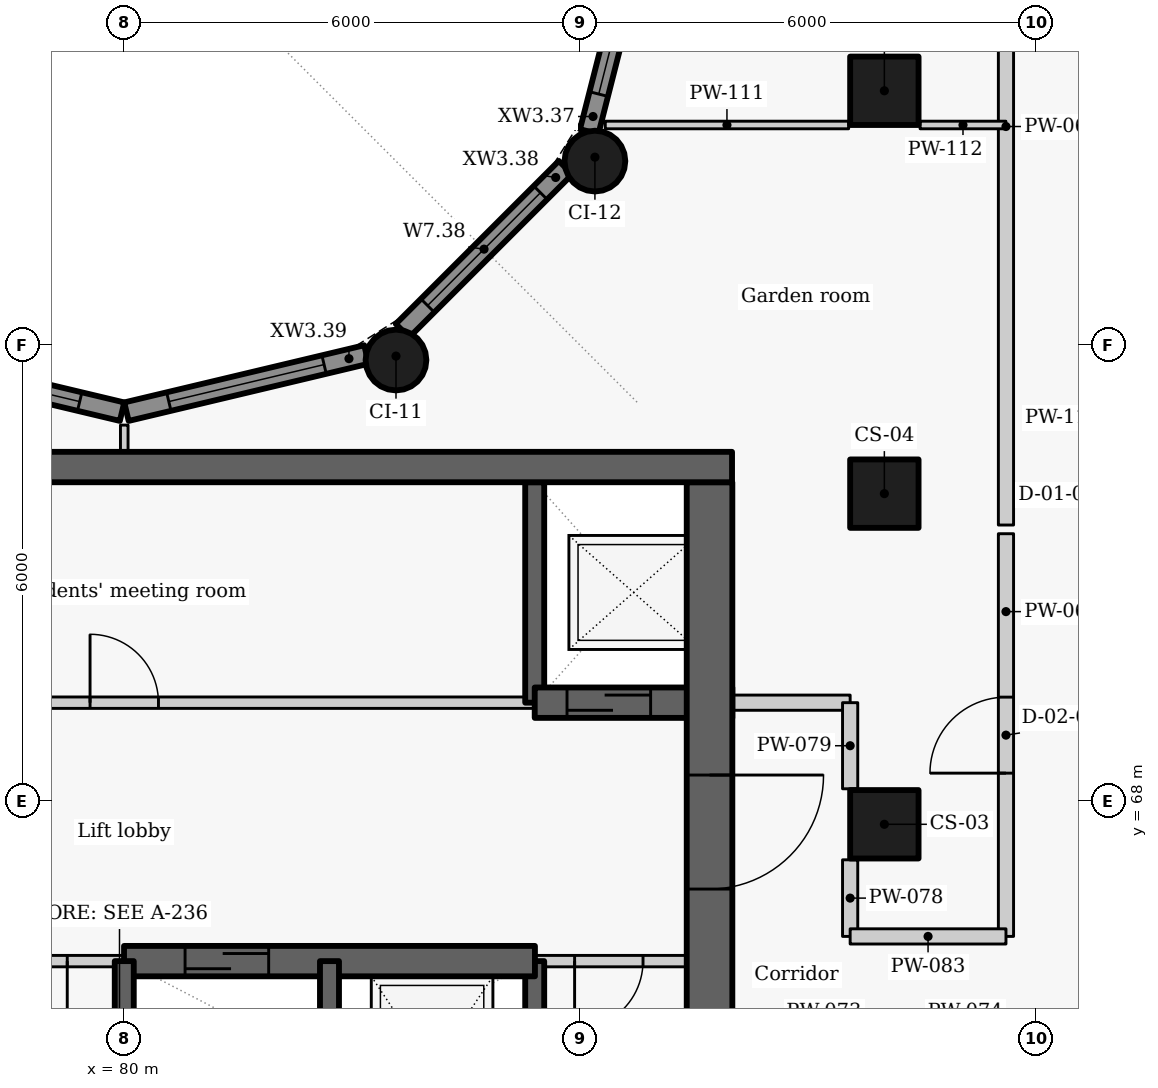
"""IFC4 building model, lengths in metres.
Left out: names, types, materials, properties, quantities, classifications, styles, units other than length and angle.
Written with IfcOpenShell. Run it as: python <this file> out.ifc"""

import sys

from ifc_helpers import new_model, si_unit, direction, frame, frame_2d, origin, origin_2d, place, context, subcontext, project, spatial, rectangle, circle, extrude, element, fill, save


model = new_model("IFC4")
c1 = context("Model", 3, precision=1e-05, world=origin(), true_north=direction((0.0, 1.0)))
c2 = subcontext(c1, "Body", "Model", "MODEL_VIEW")
j1 = project(units=[si_unit("LENGTHUNIT", "METRE"), si_unit("PLANEANGLEUNIT", "RADIAN")], contexts=[c1])
p1 = place(None, origin())
s1 = spatial("IfcSite", under=j1, at=p1, CompositionType="ELEMENT")
p2 = place(p1, origin())
s2 = spatial("IfcBuilding", under=s1, at=p2, CompositionType="ELEMENT")
p3 = place(p2, frame((0.0, 0.0, 213.0)))
s3 = spatial("IfcBuildingStorey", under=s2, at=p3, CompositionType="ELEMENT", Elevation=213.0)
for number, where, z_axis, x_axis in (
    (1, (90.0, 67.7, 0.0), (0.0, 0.0, 1.0), (0.0, 1.0, 0.0)),
    (2, (90.0, 72.05, 0.0), (0.0, 0.0, 1.0), (0.0, 1.0, 0.0)),
    (3, (90.0, 77.35, 0.0), (0.0, 0.0, 1.0), (0.0, 1.0, 0.0)),
):
    element("IfcColumn", number, at=place(p3, frame(where, z_axis=z_axis, x_axis=x_axis)), inside=s3, PredefinedType="COLUMN", context=c2, shape_type="SweptSolid", body=[
        extrude(rectangle(XDim=0.9, YDim=0.9, at=origin_2d()), origin(), (0.0, 0.0, 1.0), 3.3),
    ])
for number, where, z_axis, x_axis in (
    (4, (83.575, 73.808, 0.0), (0.0, 0.0, 1.0), (0.866, 0.5, 0.0)),
    (5, (86.192, 76.425, 0.0), (0.0, 0.0, 1.0), (0.5, 0.866, 0.0)),
):
    element("IfcColumn", number, at=place(p3, frame(where, z_axis=z_axis, x_axis=x_axis)), inside=s3, PredefinedType="COLUMN", context=c2, shape_type="SweptSolid", body=[
        extrude(circle(Radius=0.4, at=origin_2d()), origin(), (0.0, 0.0, 1.0), 3.3),
    ])
p4 = place(p3, frame((86.86, 79.73, 0.0), z_axis=(0.0, 0.0, 1.0), x_axis=(-0.247055971283, -0.969001211069, 0.0)))
e6 = element("IfcWall", 6, at=p4, inside=s3, PredefinedType="SOLIDWALL", context=c2, shape_type="SweptSolid", body=[
    extrude(rectangle(XDim=3.01, YDim=0.25, at=frame_2d((1.505, 0.0))), origin(), (0.0, 0.0, 1.0), 2.425),
])
p5 = place(p4, frame((0.401, 0.0, 0.9)))
e7 = element("IfcOpeningElement", 7, at=p5, cuts=e6, PredefinedType="OPENING", context=c2, shape_type="SweptSolid", body=[
    extrude(rectangle(XDim=2.1, YDim=1.1, at=frame_2d((1.05, 0.55))), frame((0.0, 0.135, 0.0), z_axis=(0.0, -1.0, 0.0), x_axis=(1.0, 0.0, 0.0)), (0.0, 0.0, 1.0), 0.27),
])
p6 = place(p3, frame((85.806, 76.339, 0.0), z_axis=(0.0, 0.0, 1.0), x_axis=(-0.707106781187, -0.707106781187, 0.0)))
e8 = element("IfcWall", 8, at=p6, inside=s3, PredefinedType="SOLIDWALL", context=c2, shape_type="SweptSolid", body=[
    extrude(rectangle(XDim=3.033, YDim=0.25, at=frame_2d((1.517, 0.0))), origin(), (0.0, 0.0, 1.0), 2.425),
])
p7 = place(p6, frame((0.467, 0.0, 0.9)))
e9 = element("IfcOpeningElement", 9, at=p7, cuts=e8, PredefinedType="OPENING", context=c2, shape_type="SweptSolid", body=[
    extrude(rectangle(XDim=2.1, YDim=1.1, at=frame_2d((1.05, 0.55))), frame((0.0, 0.135, 0.0), z_axis=(0.0, -1.0, 0.0), x_axis=(1.0, 0.0, 0.0)), (0.0, 0.0, 1.0), 0.27),
])
p8 = place(p3, frame((83.186, 73.881, 0.0), z_axis=(0.0, 0.0, 1.0), x_axis=(-0.972773113459, -0.231759508395, 0.0)))
e10 = element("IfcWall", 10, at=p8, inside=s3, PredefinedType="SOLIDWALL", context=c2, shape_type="SweptSolid", body=[
    extrude(rectangle(XDim=3.246, YDim=0.25, at=frame_2d((1.623, 0.0))), origin(), (0.0, 0.0, 1.0), 2.425),
])
p9 = place(p8, frame((0.573, 0.0, 0.9)))
e11 = element("IfcOpeningElement", 11, at=p9, cuts=e10, PredefinedType="OPENING", context=c2, shape_type="SweptSolid", body=[
    extrude(rectangle(XDim=2.1, YDim=1.1, at=frame_2d((1.05, 0.55))), frame((0.0, 0.135, 0.0), z_axis=(0.0, -1.0, 0.0), x_axis=(1.0, 0.0, 0.0)), (0.0, 0.0, 1.0), 0.27),
])
p10 = place(p3, frame((79.971, 73.128, 0.0), z_axis=(0.0, 0.0, 1.0), x_axis=(-0.972773113459, 0.231759508395, 0.0)))
e12 = element("IfcWall", 12, at=p10, inside=s3, PredefinedType="SOLIDWALL", context=c2, shape_type="SweptSolid", body=[
    extrude(rectangle(XDim=3.246, YDim=0.25, at=frame_2d((1.623, 0.0))), origin(), (0.0, 0.0, 1.0), 2.425),
])
p11 = place(p10, frame((0.573, 0.0, 0.9)))
e13 = element("IfcOpeningElement", 13, at=p11, cuts=e12, PredefinedType="OPENING", context=c2, shape_type="SweptSolid", body=[
    extrude(rectangle(XDim=2.1, YDim=1.1, at=frame_2d((1.05, 0.55))), frame((0.0, 0.135, 0.0), z_axis=(0.0, -1.0, 0.0), x_axis=(1.0, 0.0, 0.0)), (0.0, 0.0, 1.0), 0.27),
])
p12 = place(p3, frame((72.0, 69.3, 0.0), z_axis=(0.0, 0.0, 1.0), x_axis=(1.0, 0.0, 0.0)))
e14 = element("IfcWall", 14, at=p12, inside=s3, PredefinedType="PARTITIONING", context=c2, shape_type="SweptSolid", body=[
    extrude(rectangle(XDim=13.4, YDim=0.15, at=frame_2d((6.7, 0.0))), origin(), (0.0, 0.0, 1.0), 3.025),
])
p13 = place(p12, frame((1.175, 0.0, 0.0)))
e15 = element("IfcOpeningElement", 15, at=p13, cuts=e14, PredefinedType="OPENING", context=c2, shape_type="SweptSolid", body=[
    extrude(rectangle(XDim=0.9, YDim=2.1, at=frame_2d((0.45, 1.05))), frame((0.0, 0.085, 0.0), z_axis=(0.0, -1.0, 0.0), x_axis=(1.0, 0.0, 0.0)), (0.0, 0.0, 1.0), 0.17),
])
p14 = place(p12, frame((7.55, 0.0, 0.0)))
e16 = element("IfcOpeningElement", 16, at=p14, cuts=e14, PredefinedType="OPENING", context=c2, shape_type="SweptSolid", body=[
    extrude(rectangle(XDim=0.9, YDim=2.1, at=frame_2d((0.45, 1.05))), frame((0.0, 0.085, 0.0), z_axis=(0.0, -1.0, 0.0), x_axis=(1.0, 0.0, 0.0)), (0.0, 0.0, 1.0), 0.17),
])
p15 = place(p3, frame((85.4, 63.1, -0.275), z_axis=(0.0, 0.0, 1.0), x_axis=(0.0, 1.0, 0.0)))
e17 = element("IfcWall", 17, at=p15, inside=s3, PredefinedType="SHEAR", context=c2, shape_type="SweptSolid", body=[
    extrude(rectangle(XDim=2.8, YDim=0.25, at=frame_2d((1.4, 0.0))), origin(), (0.0, 0.0, 1.0), 3.3),
])
p16 = place(p3, frame((85.4, 69.3, -0.275), z_axis=(0.0, 0.0, 1.0), x_axis=(0.0, 1.0, 0.0)))
e18 = element("IfcWall", 18, at=p16, inside=s3, PredefinedType="SHEAR", context=c2, shape_type="SweptSolid", body=[
    extrude(rectangle(XDim=2.9, YDim=0.25, at=frame_2d((1.45, 0.0))), origin(), (0.0, 0.0, 1.0), 3.3),
])
p17 = place(p3, frame((85.4, 69.3, -0.275), z_axis=(0.0, 0.0, 1.0), x_axis=(1.0, 0.0, 0.0)))
e19 = element("IfcWall", 19, at=p17, inside=s3, PredefinedType="SHEAR", context=c2, shape_type="SweptSolid", body=[
    extrude(rectangle(XDim=2.6, YDim=0.4, at=frame_2d((1.3, 0.0))), origin(), (0.0, 0.0, 1.0), 3.3),
])
p18 = place(p17, frame((0.425, 0.0, 0.275)))
e20 = element("IfcOpeningElement", 20, at=p18, cuts=e19, PredefinedType="OPENING", context=c2, shape_type="SweptSolid", body=[
    extrude(rectangle(XDim=1.1, YDim=2.1, at=frame_2d((0.55, 1.05))), frame((0.0, 0.21, 0.0), z_axis=(0.0, -1.0, 0.0), x_axis=(1.0, 0.0, 0.0)), (0.0, 0.0, 1.0), 0.42),
])
p19 = place(p3, frame((87.7, 72.2, -0.275), z_axis=(0.0, 0.0, 1.0), x_axis=(0.0, -1.0, 0.0)))
e21 = element("IfcWall", 21, at=p19, inside=s3, PredefinedType="SHEAR", context=c2, shape_type="SweptSolid", body=[
    extrude(rectangle(XDim=14.25, YDim=0.6, at=frame_2d((7.125, 0.0))), origin(), (0.0, 0.0, 1.0), 3.3),
])
p20 = place(p19, frame((3.852, 0.0, 0.275)))
e22 = element("IfcOpeningElement", 22, at=p20, cuts=e21, PredefinedType="OPENING", context=c2, shape_type="SweptSolid", body=[
    extrude(rectangle(XDim=1.5, YDim=2.1, at=frame_2d((0.75, 1.05))), frame((0.0, 0.31, 0.0), z_axis=(0.0, -1.0, 0.0), x_axis=(1.0, 0.0, 0.0)), (0.0, 0.0, 1.0), 0.62),
])
p21 = place(p3, frame((80.003, 65.9, 0.0), z_axis=(0.0, 0.0, 1.0), x_axis=(-1.0, 0.0, 0.0)))
e23 = element("IfcWall", 23, at=p21, inside=s3, PredefinedType="PARTITIONING", context=c2, shape_type="SweptSolid", body=[
    extrude(rectangle(XDim=2.706, YDim=0.15, at=frame_2d((1.353, 0.0))), origin(), (0.0, 0.0, 1.0), 3.025),
])
p22 = place(p21, frame((0.753, 0.0, 0.0)))
e24 = element("IfcOpeningElement", 24, at=p22, cuts=e23, PredefinedType="OPENING", context=c2, shape_type="SweptSolid", body=[
    extrude(rectangle(XDim=1.2, YDim=2.1, at=frame_2d((0.6, 1.05))), frame((0.0, 0.085, 0.0), z_axis=(0.0, -1.0, 0.0), x_axis=(1.0, 0.0, 0.0)), (0.0, 0.0, 1.0), 0.17),
])
p23 = place(p3, frame((88.0, 65.9, 0.0), z_axis=(0.0, 0.0, 1.0), x_axis=(-1.0, 0.0, 0.0)))
e25 = element("IfcWall", 25, at=p23, inside=s3, PredefinedType="PARTITIONING", context=c2, shape_type="SweptSolid", body=[
    extrude(rectangle(XDim=2.603, YDim=0.15, at=frame_2d((1.302, 0.0))), origin(), (0.0, 0.0, 1.0), 3.025),
])
p24 = place(p23, frame((1.175, 0.0, 0.0)))
e26 = element("IfcOpeningElement", 26, at=p24, cuts=e25, PredefinedType="OPENING", context=c2, shape_type="SweptSolid", body=[
    extrude(rectangle(XDim=0.9, YDim=2.1, at=frame_2d((0.45, 1.05))), frame((0.0, 0.085, 0.0), z_axis=(0.0, -1.0, 0.0), x_axis=(1.0, 0.0, 0.0)), (0.0, 0.0, 1.0), 0.17),
])
p25 = place(p3, frame((79.997, 65.9, -0.275), z_axis=(0.0, 0.0, 1.0), x_axis=(1.0, 0.0, 0.0)))
e27 = element("IfcWall", 27, at=p25, inside=s3, PredefinedType="SHEAR", context=c2, shape_type="SweptSolid", body=[
    extrude(rectangle(XDim=5.406, YDim=0.4, at=frame_2d((2.703, 0.0))), origin(), (0.0, 0.0, 1.0), 3.3),
])
p26 = place(p25, frame((0.803, 0.0, 0.275)))
e28 = element("IfcOpeningElement", 28, at=p26, cuts=e27, PredefinedType="OPENING", context=c2, shape_type="SweptSolid", body=[
    extrude(rectangle(XDim=1.1, YDim=2.1, at=frame_2d((0.55, 1.05))), frame((0.0, 0.21, 0.0), z_axis=(0.0, -1.0, 0.0), x_axis=(1.0, 0.0, 0.0)), (0.0, 0.0, 1.0), 0.42),
])
for number, where, z_axis, x_axis in (
    (29, (80.0, 63.1, -0.275), (0.0, 0.0, 1.0), (0.0, 1.0, 0.0)),
    (30, (82.7, 63.1, -0.275), (0.0, 0.0, 1.0), (0.0, 1.0, 0.0)),
):
    element("IfcWall", number, at=place(p3, frame(where, z_axis=z_axis, x_axis=x_axis)), inside=s3, PredefinedType="SHEAR", context=c2, shape_type="SweptSolid", body=[
        extrude(rectangle(XDim=2.8, YDim=0.25, at=frame_2d((1.4, 0.0))), origin(), (0.0, 0.0, 1.0), 3.3),
    ])
p27 = place(p3, frame((91.6, 66.225, 0.0), z_axis=(0.0, 0.0, 1.0), x_axis=(0.0, 1.0, 0.0)))
e31 = element("IfcWall", 31, at=p27, inside=s3, PredefinedType="PARTITIONING", context=c2, shape_type="SweptSolid", body=[
    extrude(rectangle(XDim=5.298, YDim=0.2, at=frame_2d((2.649, 0.0))), origin(), (0.0, 0.0, 1.0), 3.025),
])
p28 = place(p27, frame((2.148, 0.0, 0.0)))
e32 = element("IfcOpeningElement", 32, at=p28, cuts=e31, PredefinedType="OPENING", context=c2, shape_type="SweptSolid", body=[
    extrude(rectangle(XDim=1.0, YDim=2.1, at=frame_2d((0.5, 1.05))), frame((0.0, 0.11, 0.0), z_axis=(0.0, -1.0, 0.0), x_axis=(1.0, 0.0, 0.0)), (0.0, 0.0, 1.0), 0.22),
])
p29 = place(p3, frame((91.6, 71.637, 0.0), z_axis=(0.0, 0.0, 1.0), x_axis=(0.0, 1.0, 0.0)))
e33 = element("IfcWall", 33, at=p29, inside=s3, PredefinedType="PARTITIONING", context=c2, shape_type="SweptSolid", body=[
    extrude(rectangle(XDim=10.486, YDim=0.2, at=frame_2d((5.243, 0.0))), origin(), (0.0, 0.0, 1.0), 3.025),
])
p30 = place(p3, frame((88.0, 69.3, 0.0), z_axis=(0.0, 0.0, 1.0), x_axis=(1.0, 0.0, 0.0)))
e34 = element("IfcWall", 34, at=p30, inside=s3, PredefinedType="PARTITIONING", context=c2, shape_type="SweptSolid", body=[
    extrude(rectangle(XDim=1.55, YDim=0.2, at=frame_2d((0.775, 0.0))), origin(), (0.0, 0.0, 1.0), 3.025),
])
p31 = place(p3, frame((89.55, 66.225, 0.0), z_axis=(0.0, 0.0, 1.0), x_axis=(0.0, 1.0, 0.0)))
e35 = element("IfcWall", 35, at=p31, inside=s3, PredefinedType="PARTITIONING", context=c2, shape_type="SweptSolid", body=[
    extrude(rectangle(XDim=1.008, YDim=0.2, at=frame_2d((0.504, 0.0))), origin(), (0.0, 0.0, 1.0), 3.025),
])
p32 = place(p3, frame((89.55, 68.167, 0.0), z_axis=(0.0, 0.0, 1.0), x_axis=(0.0, 1.0, 0.0)))
e36 = element("IfcWall", 36, at=p32, inside=s3, PredefinedType="PARTITIONING", context=c2, shape_type="SweptSolid", body=[
    extrude(rectangle(XDim=1.133, YDim=0.2, at=frame_2d((0.566, 0.0))), origin(), (0.0, 0.0, 1.0), 3.025),
])
p33 = place(p3, frame((89.55, 66.225, 0.0), z_axis=(0.0, 0.0, 1.0), x_axis=(1.0, 0.0, 0.0)))
e37 = element("IfcWall", 37, at=p33, inside=s3, PredefinedType="PARTITIONING", context=c2, shape_type="SweptSolid", body=[
    extrude(rectangle(XDim=2.05, YDim=0.2, at=frame_2d((1.025, 0.0))), origin(), (0.0, 0.0, 1.0), 2.505),
])
p34 = place(p3, frame((80.0, 72.6, 0.0), z_axis=(0.0, 0.0, 1.0), x_axis=(0.0, 1.0, 0.0)))
e38 = element("IfcWall", 38, at=p34, inside=s3, PredefinedType="PARTITIONING", context=c2, shape_type="SweptSolid", body=[
    extrude(rectangle(XDim=0.352, YDim=0.1, at=frame_2d((0.176, 0.0))), origin(), (0.0, 0.0, 1.0), 3.025),
])
p35 = place(p3, frame((86.328, 76.9, 0.0), z_axis=(0.0, 0.0, 1.0), x_axis=(1.0, 0.0, 0.0)))
e39 = element("IfcWall", 39, at=p35, inside=s3, PredefinedType="PARTITIONING", context=c2, shape_type="SweptSolid", body=[
    extrude(rectangle(XDim=3.202, YDim=0.1, at=frame_2d((1.601, 0.0))), origin(), (0.0, 0.0, 1.0), 3.025),
])
p36 = place(p3, frame((90.47, 76.9, 0.0), z_axis=(0.0, 0.0, 1.0), x_axis=(1.0, 0.0, 0.0)))
e40 = element("IfcWall", 40, at=p36, inside=s3, PredefinedType="PARTITIONING", context=c2, shape_type="SweptSolid", body=[
    extrude(rectangle(XDim=1.129, YDim=0.1, at=frame_2d((0.564, 0.0))), origin(), (0.0, 0.0, 1.0), 3.025),
])
p37 = place(p3, frame((72.004, 72.4, -0.275), z_axis=(0.0, 0.0, 1.0), x_axis=(1.0, 0.0, 0.0)))
e41 = element("IfcWall", 41, at=p37, inside=s3, PredefinedType="SHEAR", context=c2, shape_type="SweptSolid", body=[
    extrude(rectangle(XDim=15.992, YDim=0.4, at=frame_2d((7.996, 0.0))), origin(), (0.0, 0.0, 1.0), 3.3),
])
p38 = place(p5, origin())
e42 = element("IfcWindow", 42, at=p38, inside=s3, PartitioningType="SINGLE_PANEL", PredefinedType="WINDOW", context=c2, shape_type="SweptSolid", body=[
    extrude(rectangle(XDim=2.1, YDim=1.1, at=frame_2d((1.05, 0.55))), frame((0.0, 0.03, 0.0), z_axis=(0.0, -1.0, 0.0), x_axis=(1.0, 0.0, 0.0)), (0.0, 0.0, 1.0), 0.06),
])
fill(e7, e42)
p39 = place(p7, origin())
e43 = element("IfcWindow", 43, at=p39, inside=s3, PartitioningType="SINGLE_PANEL", PredefinedType="WINDOW", context=c2, shape_type="SweptSolid", body=[
    extrude(rectangle(XDim=2.1, YDim=1.1, at=frame_2d((1.05, 0.55))), frame((0.0, 0.03, 0.0), z_axis=(0.0, -1.0, 0.0), x_axis=(1.0, 0.0, 0.0)), (0.0, 0.0, 1.0), 0.06),
])
fill(e9, e43)
p40 = place(p9, origin())
e44 = element("IfcWindow", 44, at=p40, inside=s3, PartitioningType="SINGLE_PANEL", PredefinedType="WINDOW", context=c2, shape_type="SweptSolid", body=[
    extrude(rectangle(XDim=2.1, YDim=1.1, at=frame_2d((1.05, 0.55))), frame((0.0, 0.03, 0.0), z_axis=(0.0, -1.0, 0.0), x_axis=(1.0, 0.0, 0.0)), (0.0, 0.0, 1.0), 0.06),
])
fill(e11, e44)
p41 = place(p11, origin())
e45 = element("IfcWindow", 45, at=p41, inside=s3, PartitioningType="SINGLE_PANEL", PredefinedType="WINDOW", context=c2, shape_type="SweptSolid", body=[
    extrude(rectangle(XDim=2.1, YDim=1.1, at=frame_2d((1.05, 0.55))), frame((0.0, 0.03, 0.0), z_axis=(0.0, -1.0, 0.0), x_axis=(1.0, 0.0, 0.0)), (0.0, 0.0, 1.0), 0.06),
])
fill(e13, e45)
p42 = place(p18, origin())
e46 = element("IfcDoor", 46, at=p42, inside=s3, OperationType="SLIDING_TO_LEFT", PredefinedType="DOOR", context=c2, shape_type="SweptSolid", body=[
    extrude(rectangle(XDim=1.1, YDim=2.1, at=frame_2d((0.55, 1.05))), frame((0.0, 0.025, 0.0), z_axis=(0.0, -1.0, 0.0), x_axis=(1.0, 0.0, 0.0)), (0.0, 0.0, 1.0), 0.05),
])
fill(e20, e46)
p43 = place(p14, origin())
e47 = element("IfcDoor", 47, at=p43, inside=s3, OperationType="SINGLE_SWING_LEFT", PredefinedType="DOOR", context=c2, shape_type="SweptSolid", body=[
    extrude(rectangle(XDim=0.9, YDim=2.1, at=frame_2d((0.45, 1.05))), frame((0.0, 0.025, 0.0), z_axis=(0.0, -1.0, 0.0), x_axis=(1.0, 0.0, 0.0)), (0.0, 0.0, 1.0), 0.05),
])
fill(e16, e47)
p44 = place(p22, origin())
e48 = element("IfcDoor", 48, at=p44, inside=s3, OperationType="DOUBLE_DOOR_SINGLE_SWING", PredefinedType="DOOR", context=c2, shape_type="SweptSolid", body=[
    extrude(rectangle(XDim=1.2, YDim=2.1, at=frame_2d((0.6, 1.05))), frame((0.0, 0.025, 0.0), z_axis=(0.0, -1.0, 0.0), x_axis=(1.0, 0.0, 0.0)), (0.0, 0.0, 1.0), 0.05),
])
fill(e24, e48)
p45 = place(p26, origin())
e49 = element("IfcDoor", 49, at=p45, inside=s3, OperationType="SLIDING_TO_LEFT", PredefinedType="DOOR", context=c2, shape_type="SweptSolid", body=[
    extrude(rectangle(XDim=1.1, YDim=2.1, at=frame_2d((0.55, 1.05))), frame((0.0, 0.025, 0.0), z_axis=(0.0, -1.0, 0.0), x_axis=(1.0, 0.0, 0.0)), (0.0, 0.0, 1.0), 0.05),
])
fill(e28, e49)
p46 = place(p24, origin())
e50 = element("IfcDoor", 50, at=p46, inside=s3, OperationType="SINGLE_SWING_RIGHT", PredefinedType="DOOR", context=c2, shape_type="SweptSolid", body=[
    extrude(rectangle(XDim=0.9, YDim=2.1, at=frame_2d((0.45, 1.05))), frame((0.0, 0.025, 0.0), z_axis=(0.0, -1.0, 0.0), x_axis=(1.0, 0.0, 0.0)), (0.0, 0.0, 1.0), 0.05),
])
fill(e26, e50)
p47 = place(p28, origin())
e51 = element("IfcDoor", 51, at=p47, inside=s3, OperationType="SINGLE_SWING_LEFT", PredefinedType="DOOR", context=c2, shape_type="SweptSolid", body=[
    extrude(rectangle(XDim=1.0, YDim=2.1, at=frame_2d((0.5, 1.05))), frame((0.0, 0.025, 0.0), z_axis=(0.0, -1.0, 0.0), x_axis=(1.0, 0.0, 0.0)), (0.0, 0.0, 1.0), 0.05),
])
fill(e32, e51)
p48 = place(p20, origin())
e52 = element("IfcDoor", 52, at=p48, inside=s3, OperationType="DOUBLE_DOOR_SINGLE_SWING", PredefinedType="DOOR", context=c2, shape_type="SweptSolid", body=[
    extrude(rectangle(XDim=1.5, YDim=2.1, at=frame_2d((0.75, 1.05))), frame((0.0, 0.025, 0.0), z_axis=(0.0, -1.0, 0.0), x_axis=(1.0, 0.0, 0.0)), (0.0, 0.0, 1.0), 0.05),
])
fill(e22, e52)
save(model, sys.argv[1])
